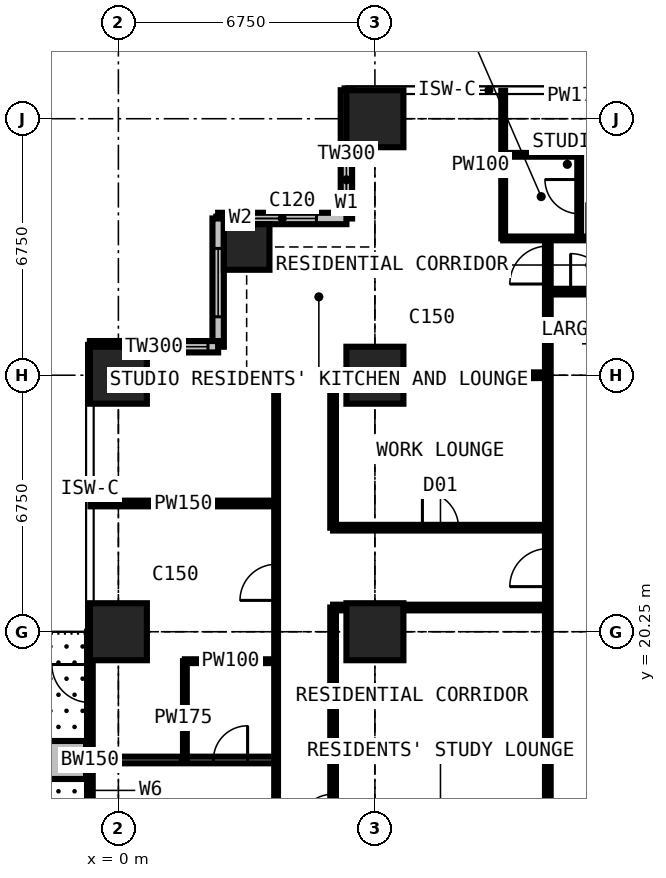
"""IFC4 building model, lengths in metres.
Left out: names, types, materials, properties, quantities, classifications, styles, units other than length and angle.
Written with IfcOpenShell. Run it as: python <this file> out.ifc"""

import sys

from ifc_helpers import new_model, si_unit, direction, frame, frame_2d, origin, origin_2d, place, context, subcontext, project, spatial, rectangle, extrude, element, fill, save


model = new_model("IFC4")
c1 = context("Model", 3, precision=1e-05, world=origin(), true_north=direction((0.0, 1.0)))
c2 = subcontext(c1, "Body", "Model", "MODEL_VIEW")
j1 = project(units=[si_unit("LENGTHUNIT", "METRE"), si_unit("PLANEANGLEUNIT", "RADIAN")], contexts=[c1])
p1 = place(None, origin())
s1 = spatial("IfcSite", under=j1, at=p1, CompositionType="ELEMENT")
p2 = place(p1, origin())
s2 = spatial("IfcBuilding", under=s1, at=p2, CompositionType="ELEMENT")
p3 = place(p2, frame((0.0, 0.0, 149.4)))
s3 = spatial("IfcBuildingStorey", under=s2, at=p3, CompositionType="ELEMENT", Elevation=149.4)
for number, where, z_axis, x_axis in (
    (1, (0.0, 20.25, 0.0), (0.0, 0.0, 1.0), (1.0, 0.0, 0.0)),
    (2, (0.0, 27.0, 0.0), (0.0, 0.0, 1.0), (1.0, 0.0, 0.0)),
):
    element("IfcColumn", number, at=place(p3, frame(where, z_axis=z_axis, x_axis=x_axis)), inside=s3, PredefinedType="COLUMN", context=c2, shape_type="SweptSolid", body=[
        extrude(rectangle(XDim=1.5, YDim=1.5, at=origin_2d()), origin(), (0.0, 0.0, 1.0), 3.6),
    ])
p4 = place(p3, frame((3.375, 30.375, 0.0), z_axis=(0.0, 0.0, 1.0), x_axis=(1.0, 0.0, 0.0)))
e3 = element("IfcColumn", 3, at=p4, inside=s3, PredefinedType="COLUMN", context=c2, shape_type="SweptSolid", body=[
    extrude(rectangle(XDim=1.2, YDim=1.2, at=origin_2d()), origin(), (0.0, 0.0, 1.0), 3.6),
])
for number, where, z_axis, x_axis in (
    (4, (6.75, 20.25, 0.0), (0.0, 0.0, 1.0), (1.0, 0.0, 0.0)),
    (5, (6.75, 27.0, 0.0), (0.0, 0.0, 1.0), (1.0, 0.0, 0.0)),
    (6, (6.75, 33.75, 0.0), (0.0, 0.0, 1.0), (1.0, 0.0, 0.0)),
):
    element("IfcColumn", number, at=place(p3, frame(where, z_axis=z_axis, x_axis=x_axis)), inside=s3, PredefinedType="COLUMN", context=c2, shape_type="SweptSolid", body=[
        extrude(rectangle(XDim=1.5, YDim=1.5, at=origin_2d()), origin(), (0.0, 0.0, 1.0), 3.6),
    ])
p5 = place(p3, frame((6.0, 34.5, 0.0), z_axis=(0.0, 0.0, 1.0), x_axis=(0.0, -1.0, 0.0)))
e7 = element("IfcWall", 7, at=p5, inside=s3, PredefinedType="SOLIDWALL", context=c2, shape_type="SweptSolid", body=[
    extrude(rectangle(XDim=3.375, YDim=0.3, at=frame_2d((1.688, 0.0))), origin(), (0.0, 0.0, 1.0), 3.375),
])
p6 = place(p5, frame((1.607, 0.0, 0.9)))
e8 = element("IfcOpeningElement", 8, at=p6, cuts=e7, PredefinedType="OPENING", context=c2, shape_type="SweptSolid", body=[
    extrude(rectangle(XDim=1.5, YDim=1.8, at=frame_2d((0.75, 0.9))), frame((0.0, 0.16, 0.0), z_axis=(0.0, -1.0, 0.0), x_axis=(1.0, 0.0, 0.0)), (0.0, 0.0, 1.0), 0.32),
])
p7 = place(p3, frame((6.0, 31.125, 0.0), z_axis=(0.0, 0.0, 1.0), x_axis=(-1.0, 0.0, 0.0)))
e9 = element("IfcWall", 9, at=p7, inside=s3, PredefinedType="SOLIDWALL", context=c2, shape_type="SweptSolid", body=[
    extrude(rectangle(XDim=3.375, YDim=0.3, at=frame_2d((1.688, 0.0))), origin(), (0.0, 0.0, 1.0), 3.375),
])
p8 = place(p7, frame((0.788, 0.0, 0.6)))
e10 = element("IfcOpeningElement", 10, at=p8, cuts=e9, PredefinedType="OPENING", context=c2, shape_type="SweptSolid", body=[
    extrude(rectangle(XDim=1.8, YDim=2.1, at=frame_2d((0.9, 1.05))), frame((0.0, 0.16, 0.0), z_axis=(0.0, -1.0, 0.0), x_axis=(1.0, 0.0, 0.0)), (0.0, 0.0, 1.0), 0.32),
])
p9 = place(p3, frame((2.625, 31.125, 0.0), z_axis=(0.0, 0.0, 1.0), x_axis=(0.0, -1.0, 0.0)))
e11 = element("IfcWall", 11, at=p9, inside=s3, PredefinedType="SOLIDWALL", context=c2, shape_type="SweptSolid", body=[
    extrude(rectangle(XDim=3.375, YDim=0.3, at=frame_2d((1.688, 0.0))), origin(), (0.0, 0.0, 1.0), 3.375),
])
p10 = place(p9, frame((0.788, 0.0, 0.6)))
e12 = element("IfcOpeningElement", 12, at=p10, cuts=e11, PredefinedType="OPENING", context=c2, shape_type="SweptSolid", body=[
    extrude(rectangle(XDim=1.8, YDim=2.1, at=frame_2d((0.9, 1.05))), frame((0.0, 0.16, 0.0), z_axis=(0.0, -1.0, 0.0), x_axis=(1.0, 0.0, 0.0)), (0.0, 0.0, 1.0), 0.32),
])
p11 = place(p3, frame((2.625, 27.75, 0.0), z_axis=(0.0, 0.0, 1.0), x_axis=(-1.0, 0.0, 0.0)))
e13 = element("IfcWall", 13, at=p11, inside=s3, PredefinedType="SOLIDWALL", context=c2, shape_type="SweptSolid", body=[
    extrude(rectangle(XDim=3.375, YDim=0.3, at=frame_2d((1.688, 0.0))), origin(), (0.0, 0.0, 1.0), 3.375),
])
p12 = place(p11, frame((0.268, 0.0, 0.9)))
e14 = element("IfcOpeningElement", 14, at=p12, cuts=e13, PredefinedType="OPENING", context=c2, shape_type="SweptSolid", body=[
    extrude(rectangle(XDim=1.5, YDim=1.8, at=frame_2d((0.75, 0.9))), frame((0.0, 0.16, 0.0), z_axis=(0.0, -1.0, 0.0), x_axis=(1.0, 0.0, 0.0)), (0.0, 0.0, 1.0), 0.32),
])
p13 = place(p3, frame((-0.75, 13.5, 0.0), z_axis=(0.0, 0.0, 1.0), x_axis=(0.0, 1.0, 0.0)))
e15 = element("IfcWall", 15, at=p13, inside=s3, PredefinedType="SOLIDWALL", context=c2, shape_type="SweptSolid", body=[
    extrude(rectangle(XDim=6.75, YDim=0.15, at=frame_2d((3.375, 0.0))), origin(), (0.0, 0.0, 1.0), 3.375),
])
p14 = place(p13, frame((0.863, 0.0, 0.0)))
e16 = element("IfcOpeningElement", 16, at=p14, cuts=e15, PredefinedType="OPENING", context=c2, shape_type="SweptSolid", body=[
    extrude(rectangle(XDim=1.0, YDim=2.2, at=frame_2d((0.5, 1.1))), frame((0.0, 0.085, 0.0), z_axis=(0.0, -1.0, 0.0), x_axis=(1.0, 0.0, 0.0)), (0.0, 0.0, 1.0), 0.17),
])
p15 = place(p13, frame((1.975, 0.0, 0.9)))
e17 = element("IfcOpeningElement", 17, at=p15, cuts=e15, PredefinedType="OPENING", context=c2, shape_type="SweptSolid", body=[
    extrude(rectangle(XDim=1.2, YDim=1.8, at=frame_2d((0.6, 0.9))), frame((0.0, 0.085, 0.0), z_axis=(0.0, -1.0, 0.0), x_axis=(1.0, 0.0, 0.0)), (0.0, 0.0, 1.0), 0.17),
])
p16 = place(p13, frame((4.887, 0.0, 0.0)))
e18 = element("IfcOpeningElement", 18, at=p16, cuts=e15, PredefinedType="OPENING", context=c2, shape_type="SweptSolid", body=[
    extrude(rectangle(XDim=1.0, YDim=2.2, at=frame_2d((0.5, 1.1))), frame((0.0, 0.085, 0.0), z_axis=(0.0, -1.0, 0.0), x_axis=(1.0, 0.0, 0.0)), (0.0, 0.0, 1.0), 0.17),
])
p17 = place(p13, frame((3.575, 0.0, 0.9)))
e19 = element("IfcOpeningElement", 19, at=p17, cuts=e15, PredefinedType="OPENING", context=c2, shape_type="SweptSolid", body=[
    extrude(rectangle(XDim=1.2, YDim=1.8, at=frame_2d((0.6, 0.9))), frame((0.0, 0.085, 0.0), z_axis=(0.0, -1.0, 0.0), x_axis=(1.0, 0.0, 0.0)), (0.0, 0.0, 1.0), 0.17),
])
p18 = place(p3, frame((-0.85, 16.875, 0.0), z_axis=(0.0, 0.0, 1.0), x_axis=(-1.0, 0.0, 0.0)))
e20 = element("IfcWall", 20, at=p18, inside=s3, PredefinedType="USERDEFINED", context=c2, shape_type="SweptSolid", body=[
    extrude(rectangle(XDim=2.2, YDim=1.0, at=frame_2d((1.1, 0.0))), origin(), (0.0, 0.0, 1.0), 0.9),
])
p19 = place(p3, frame((-0.734, 16.875, 0.0), z_axis=(0.0, 0.0, 1.0), x_axis=(1.0, 0.0, 0.0)))
e21 = element("IfcWall", 21, at=p19, inside=s3, PredefinedType="PARTITIONING", context=c2, shape_type="SweptSolid", body=[
    extrude(rectangle(XDim=4.884, YDim=0.175, at=frame_2d((2.442, 0.0))), origin(), (0.0, 0.0, 1.0), 3.375),
])
p20 = place(p19, frame((3.234, 0.0, 0.0)))
e22 = element("IfcOpeningElement", 22, at=p20, cuts=e21, PredefinedType="OPENING", context=c2, shape_type="SweptSolid", body=[
    extrude(rectangle(XDim=0.9, YDim=2.2, at=frame_2d((0.45, 1.1))), frame((0.0, 0.097, 0.0), z_axis=(0.0, -1.0, 0.0), x_axis=(1.0, 0.0, 0.0)), (0.0, 0.0, 1.0), 0.195),
])
p21 = place(p3, frame((-0.734, 23.625, 0.0), z_axis=(0.0, 0.0, 1.0), x_axis=(1.0, 0.0, 0.0)))
e23 = element("IfcWall", 23, at=p21, inside=s3, PredefinedType="PARTITIONING", context=c2, shape_type="SweptSolid", body=[
    extrude(rectangle(XDim=4.884, YDim=0.15, at=frame_2d((2.442, 0.0))), origin(), (0.0, 0.0, 1.0), 3.375),
])
p22 = place(p3, frame((1.75, 16.875, 0.0), z_axis=(0.0, 0.0, 1.0), x_axis=(0.0, 1.0, 0.0)))
e24 = element("IfcWall", 24, at=p22, inside=s3, PredefinedType="PARTITIONING", context=c2, shape_type="SweptSolid", body=[
    extrude(rectangle(XDim=2.6, YDim=0.1, at=frame_2d((1.3, 0.0))), origin(), (0.0, 0.0, 1.0), 3.375),
])
p23 = place(p3, frame((1.75, 19.475, 0.0), z_axis=(0.0, 0.0, 1.0), x_axis=(1.0, 0.0, 0.0)))
e25 = element("IfcWall", 25, at=p23, inside=s3, PredefinedType="PARTITIONING", context=c2, shape_type="SweptSolid", body=[
    extrude(rectangle(XDim=2.4, YDim=0.1, at=frame_2d((1.2, 0.0))), origin(), (0.0, 0.0, 1.0), 3.375),
])
p24 = place(p3, frame((4.15, 10.125, 0.0), z_axis=(0.0, 0.0, 1.0), x_axis=(0.0, 1.0, 0.0)))
e26 = element("IfcWall", 26, at=p24, inside=s3, PredefinedType="PARTITIONING", context=c2, shape_type="SweptSolid", body=[
    extrude(rectangle(XDim=16.875, YDim=0.1, at=frame_2d((8.438, 0.0))), origin(), (0.0, 0.0, 1.0), 3.375),
])
p25 = place(p24, frame((4.2, 0.0, 0.0)))
e27 = element("IfcOpeningElement", 27, at=p25, cuts=e26, PredefinedType="OPENING", context=c2, shape_type="SweptSolid", body=[
    extrude(rectangle(XDim=0.95, YDim=2.2, at=frame_2d((0.475, 1.1))), frame((0.0, 0.06, 0.0), z_axis=(0.0, -1.0, 0.0), x_axis=(1.0, 0.0, 0.0)), (0.0, 0.0, 1.0), 0.12),
])
p26 = place(p24, frame((10.95, 0.0, 0.0)))
e28 = element("IfcOpeningElement", 28, at=p26, cuts=e26, PredefinedType="OPENING", context=c2, shape_type="SweptSolid", body=[
    extrude(rectangle(XDim=0.95, YDim=2.2, at=frame_2d((0.475, 1.1))), frame((0.0, 0.06, 0.0), z_axis=(0.0, -1.0, 0.0), x_axis=(1.0, 0.0, 0.0)), (0.0, 0.0, 1.0), 0.12),
])
p27 = place(p3, frame((4.15, 27.0, 0.0), z_axis=(0.0, 0.0, 1.0), x_axis=(1.0, 0.0, 0.0)))
e29 = element("IfcWall", 29, at=p27, inside=s3, PredefinedType="PARTITIONING", context=c2, shape_type="SweptSolid", body=[
    extrude(rectangle(XDim=7.15, YDim=0.15, at=frame_2d((3.575, 0.0))), origin(), (0.0, 0.0, 1.0), 2.806),
])
p28 = place(p3, frame((5.65, 10.125, 0.0), z_axis=(0.0, 0.0, 1.0), x_axis=(0.0, 1.0, 0.0)))
e30 = element("IfcWall", 30, at=p28, inside=s3, PredefinedType="PARTITIONING", context=c2, shape_type="SweptSolid", body=[
    extrude(rectangle(XDim=10.762, YDim=0.15, at=frame_2d((5.381, 0.0))), origin(), (0.0, 0.0, 1.0), 3.375),
])
p29 = place(p28, frame((4.9, 0.0, 0.0)))
e31 = element("IfcOpeningElement", 31, at=p29, cuts=e30, PredefinedType="OPENING", context=c2, shape_type="SweptSolid", body=[
    extrude(rectangle(XDim=0.95, YDim=2.2, at=frame_2d((0.475, 1.1))), frame((0.0, 0.085, 0.0), z_axis=(0.0, -1.0, 0.0), x_axis=(1.0, 0.0, 0.0)), (0.0, 0.0, 1.0), 0.17),
])
p30 = place(p3, frame((5.65, 20.887, 0.0), z_axis=(0.0, 0.0, 1.0), x_axis=(1.0, 0.0, 0.0)))
e32 = element("IfcWall", 32, at=p30, inside=s3, PredefinedType="PARTITIONING", context=c2, shape_type="SweptSolid", body=[
    extrude(rectangle(XDim=5.65, YDim=0.15, at=frame_2d((2.825, 0.0))), origin(), (0.0, 0.0, 1.0), 3.375),
])
p31 = place(p3, frame((5.65, 22.988, 0.0), z_axis=(0.0, 0.0, 1.0), x_axis=(0.0, 1.0, 0.0)))
e33 = element("IfcWall", 33, at=p31, inside=s3, PredefinedType="PARTITIONING", context=c2, shape_type="SweptSolid", body=[
    extrude(rectangle(XDim=4.012, YDim=0.15, at=frame_2d((2.006, 0.0))), origin(), (0.0, 0.0, 1.0), 3.375),
])
p32 = place(p3, frame((5.65, 22.988, 0.0), z_axis=(0.0, 0.0, 1.0), x_axis=(1.0, 0.0, 0.0)))
e34 = element("IfcWall", 34, at=p32, inside=s3, PredefinedType="PARTITIONING", context=c2, shape_type="SweptSolid", body=[
    extrude(rectangle(XDim=5.65, YDim=0.15, at=frame_2d((2.825, 0.0))), origin(), (0.0, 0.0, 1.0), 3.375),
])
p33 = place(p32, frame((2.35, 0.0, 0.0)))
e35 = element("IfcOpeningElement", 35, at=p33, cuts=e34, PredefinedType="OPENING", context=c2, shape_type="SweptSolid", body=[
    extrude(rectangle(XDim=0.95, YDim=2.2, at=frame_2d((0.475, 1.1))), frame((0.0, 0.085, 0.0), z_axis=(0.0, -1.0, 0.0), x_axis=(1.0, 0.0, 0.0)), (0.0, 0.0, 1.0), 0.17),
])
p34 = place(p3, frame((10.125, 30.6, 0.0), z_axis=(0.0, 0.0, 1.0), x_axis=(0.0, 1.0, 0.0)))
e36 = element("IfcWall", 36, at=p34, inside=s3, PredefinedType="PARTITIONING", context=c2, shape_type="SweptSolid", body=[
    extrude(rectangle(XDim=3.884, YDim=0.1, at=frame_2d((1.942, 0.0))), origin(), (0.0, 0.0, 1.0), 3.375),
])
p35 = place(p3, frame((10.125, 30.6, 0.0), z_axis=(0.0, 0.0, 1.0), x_axis=(1.0, 0.0, 0.0)))
e37 = element("IfcWall", 37, at=p35, inside=s3, PredefinedType="PARTITIONING", context=c2, shape_type="SweptSolid", body=[
    extrude(rectangle(XDim=3.375, YDim=0.1, at=frame_2d((1.688, 0.0))), origin(), (0.0, 0.0, 1.0), 3.375),
])
p36 = place(p35, frame((2.2, 0.0, 0.0)))
e38 = element("IfcOpeningElement", 38, at=p36, cuts=e37, PredefinedType="OPENING", context=c2, shape_type="SweptSolid", body=[
    extrude(rectangle(XDim=0.95, YDim=2.2, at=frame_2d((0.475, 1.1))), frame((0.0, 0.06, 0.0), z_axis=(0.0, -1.0, 0.0), x_axis=(1.0, 0.0, 0.0)), (0.0, 0.0, 1.0), 0.12),
])
p37 = place(p3, frame((10.125, 32.8, 0.0), z_axis=(0.0, 0.0, 1.0), x_axis=(1.0, 0.0, 0.0)))
e39 = element("IfcWall", 39, at=p37, inside=s3, PredefinedType="PARTITIONING", context=c2, shape_type="SweptSolid", body=[
    extrude(rectangle(XDim=2.0, YDim=0.1, at=frame_2d((1.0, 0.0))), origin(), (0.0, 0.0, 1.0), 3.375),
])
p38 = place(p3, frame((11.3, 11.3, 0.0), z_axis=(0.0, 0.0, 1.0), x_axis=(0.0, 1.0, 0.0)))
e40 = element("IfcWall", 40, at=p38, inside=s3, PredefinedType="PARTITIONING", context=c2, shape_type="SweptSolid", body=[
    extrude(rectangle(XDim=19.3, YDim=0.15, at=frame_2d((9.65, 0.0))), origin(), (0.0, 0.0, 1.0), 3.375),
])
p39 = place(p38, frame((18.1, 0.0, 0.0)))
e41 = element("IfcOpeningElement", 41, at=p39, cuts=e40, PredefinedType="OPENING", context=c2, shape_type="SweptSolid", body=[
    extrude(rectangle(XDim=1.0, YDim=2.2, at=frame_2d((0.5, 1.1))), frame((0.0, 0.085, 0.0), z_axis=(0.0, -1.0, 0.0), x_axis=(1.0, 0.0, 0.0)), (0.0, 0.0, 1.0), 0.17),
])
p40 = place(p38, frame((10.137, 0.0, 0.0)))
e42 = element("IfcOpeningElement", 42, at=p40, cuts=e40, PredefinedType="OPENING", context=c2, shape_type="SweptSolid", body=[
    extrude(rectangle(XDim=1.0, YDim=2.2, at=frame_2d((0.5, 1.1))), frame((0.0, 0.085, 0.0), z_axis=(0.0, -1.0, 0.0), x_axis=(1.0, 0.0, 0.0)), (0.0, 0.0, 1.0), 0.17),
])
p41 = place(p3, frame((11.3, 29.2, 0.0), z_axis=(0.0, 0.0, 1.0), x_axis=(1.0, 0.0, 0.0)))
e43 = element("IfcWall", 43, at=p41, inside=s3, PredefinedType="PARTITIONING", context=c2, shape_type="SweptSolid", body=[
    extrude(rectangle(XDim=19.809, YDim=0.15, at=frame_2d((9.904, 0.0))), origin(), (0.0, 0.0, 1.0), 3.375),
])
p42 = place(p41, frame((12.9, 0.0, 0.0)))
e44 = element("IfcOpeningElement", 44, at=p42, cuts=e43, PredefinedType="OPENING", context=c2, shape_type="SweptSolid", body=[
    extrude(rectangle(XDim=1.0, YDim=2.2, at=frame_2d((0.5, 1.1))), frame((0.0, 0.085, 0.0), z_axis=(0.0, -1.0, 0.0), x_axis=(1.0, 0.0, 0.0)), (0.0, 0.0, 1.0), 0.17),
])
p43 = place(p41, frame((6.4, 0.0, 0.0)))
e45 = element("IfcOpeningElement", 45, at=p43, cuts=e43, PredefinedType="OPENING", context=c2, shape_type="SweptSolid", body=[
    extrude(rectangle(XDim=0.95, YDim=2.2, at=frame_2d((0.475, 1.1))), frame((0.0, 0.085, 0.0), z_axis=(0.0, -1.0, 0.0), x_axis=(1.0, 0.0, 0.0)), (0.0, 0.0, 1.0), 0.17),
])
p44 = place(p41, frame((0.6, 0.0, 0.0)))
e46 = element("IfcOpeningElement", 46, at=p44, cuts=e43, PredefinedType="OPENING", context=c2, shape_type="SweptSolid", body=[
    extrude(rectangle(XDim=1.0, YDim=2.2, at=frame_2d((0.5, 1.1))), frame((0.0, 0.085, 0.0), z_axis=(0.0, -1.0, 0.0), x_axis=(1.0, 0.0, 0.0)), (0.0, 0.0, 1.0), 0.17),
])
p45 = place(p3, frame((12.125, 30.6, 0.0), z_axis=(0.0, 0.0, 1.0), x_axis=(0.0, 1.0, 0.0)))
e47 = element("IfcWall", 47, at=p45, inside=s3, PredefinedType="PARTITIONING", context=c2, shape_type="SweptSolid", body=[
    extrude(rectangle(XDim=2.2, YDim=0.1, at=frame_2d((1.1, 0.0))), origin(), (0.0, 0.0, 1.0), 3.375),
])
p46 = place(p45, frame((0.65, 0.0, 0.0)))
e48 = element("IfcOpeningElement", 48, at=p46, cuts=e47, PredefinedType="OPENING", context=c2, shape_type="SweptSolid", body=[
    extrude(rectangle(XDim=0.9, YDim=2.2, at=frame_2d((0.45, 1.1))), frame((0.0, 0.06, 0.0), z_axis=(0.0, -1.0, 0.0), x_axis=(1.0, 0.0, 0.0)), (0.0, 0.0, 1.0), 0.12),
])
p47 = place(p6, origin())
e49 = element("IfcWindow", 49, at=p47, inside=s3, PartitioningType="SINGLE_PANEL", PredefinedType="WINDOW", context=c2, shape_type="SweptSolid", body=[
    extrude(rectangle(XDim=1.5, YDim=1.8, at=frame_2d((0.75, 0.9))), frame((0.0, 0.03, 0.0), z_axis=(0.0, -1.0, 0.0), x_axis=(1.0, 0.0, 0.0)), (0.0, 0.0, 1.0), 0.06),
])
fill(e8, e49)
p48 = place(p8, origin())
e50 = element("IfcWindow", 50, at=p48, inside=s3, PartitioningType="SINGLE_PANEL", PredefinedType="WINDOW", context=c2, shape_type="SweptSolid", body=[
    extrude(rectangle(XDim=1.8, YDim=2.1, at=frame_2d((0.9, 1.05))), frame((0.0, 0.03, 0.0), z_axis=(0.0, -1.0, 0.0), x_axis=(1.0, 0.0, 0.0)), (0.0, 0.0, 1.0), 0.06),
])
fill(e10, e50)
p49 = place(p10, origin())
e51 = element("IfcWindow", 51, at=p49, inside=s3, PartitioningType="SINGLE_PANEL", PredefinedType="WINDOW", context=c2, shape_type="SweptSolid", body=[
    extrude(rectangle(XDim=1.8, YDim=2.1, at=frame_2d((0.9, 1.05))), frame((0.0, 0.03, 0.0), z_axis=(0.0, -1.0, 0.0), x_axis=(1.0, 0.0, 0.0)), (0.0, 0.0, 1.0), 0.06),
])
fill(e12, e51)
p50 = place(p12, origin())
e52 = element("IfcWindow", 52, at=p50, inside=s3, PartitioningType="SINGLE_PANEL", PredefinedType="WINDOW", context=c2, shape_type="SweptSolid", body=[
    extrude(rectangle(XDim=1.5, YDim=1.8, at=frame_2d((0.75, 0.9))), frame((0.0, 0.03, 0.0), z_axis=(0.0, -1.0, 0.0), x_axis=(1.0, 0.0, 0.0)), (0.0, 0.0, 1.0), 0.06),
])
fill(e14, e52)
p51 = place(p15, origin())
e53 = element("IfcWindow", 53, at=p51, inside=s3, PartitioningType="SINGLE_PANEL", PredefinedType="WINDOW", context=c2, shape_type="SweptSolid", body=[
    extrude(rectangle(XDim=1.2, YDim=1.8, at=frame_2d((0.6, 0.9))), frame((0.0, 0.03, 0.0), z_axis=(0.0, -1.0, 0.0), x_axis=(1.0, 0.0, 0.0)), (0.0, 0.0, 1.0), 0.06),
])
fill(e17, e53)
p52 = place(p16, origin())
e54 = element("IfcDoor", 54, at=p52, inside=s3, OperationType="SINGLE_SWING_RIGHT", PredefinedType="DOOR", context=c2, shape_type="SweptSolid", body=[
    extrude(rectangle(XDim=1.0, YDim=2.2, at=frame_2d((0.5, 1.1))), frame((0.0, 0.025, 0.0), z_axis=(0.0, -1.0, 0.0), x_axis=(1.0, 0.0, 0.0)), (0.0, 0.0, 1.0), 0.05),
])
fill(e18, e54)
p53 = place(p17, origin())
e55 = element("IfcWindow", 55, at=p53, inside=s3, PartitioningType="SINGLE_PANEL", PredefinedType="WINDOW", context=c2, shape_type="SweptSolid", body=[
    extrude(rectangle(XDim=1.2, YDim=1.8, at=frame_2d((0.6, 0.9))), frame((0.0, 0.03, 0.0), z_axis=(0.0, -1.0, 0.0), x_axis=(1.0, 0.0, 0.0)), (0.0, 0.0, 1.0), 0.06),
])
fill(e19, e55)
p54 = place(p46, origin())
e56 = element("IfcDoor", 56, at=p54, inside=s3, OperationType="SINGLE_SWING_RIGHT", PredefinedType="DOOR", context=c2, shape_type="SweptSolid", body=[
    extrude(rectangle(XDim=0.9, YDim=2.2, at=frame_2d((0.45, 1.1))), frame((0.0, 0.025, 0.0), z_axis=(0.0, -1.0, 0.0), x_axis=(1.0, 0.0, 0.0)), (0.0, 0.0, 1.0), 0.05),
])
fill(e48, e56)
p55 = place(p44, origin())
e57 = element("IfcDoor", 57, at=p55, inside=s3, OperationType="SINGLE_SWING_LEFT", PredefinedType="DOOR", context=c2, shape_type="SweptSolid", body=[
    extrude(rectangle(XDim=1.0, YDim=2.2, at=frame_2d((0.5, 1.1))), frame((0.0, 0.025, 0.0), z_axis=(0.0, -1.0, 0.0), x_axis=(1.0, 0.0, 0.0)), (0.0, 0.0, 1.0), 0.05),
])
fill(e46, e57)
p56 = place(p39, origin())
e58 = element("IfcDoor", 58, at=p56, inside=s3, OperationType="SINGLE_SWING_LEFT", PredefinedType="DOOR", context=c2, shape_type="SweptSolid", body=[
    extrude(rectangle(XDim=1.0, YDim=2.2, at=frame_2d((0.5, 1.1))), frame((0.0, 0.025, 0.0), z_axis=(0.0, -1.0, 0.0), x_axis=(1.0, 0.0, 0.0)), (0.0, 0.0, 1.0), 0.05),
])
fill(e41, e58)
p57 = place(p26, origin())
e59 = element("IfcDoor", 59, at=p57, inside=s3, OperationType="SINGLE_SWING_LEFT", PredefinedType="DOOR", context=c2, shape_type="SweptSolid", body=[
    extrude(rectangle(XDim=0.95, YDim=2.2, at=frame_2d((0.475, 1.1))), frame((0.0, 0.025, 0.0), z_axis=(0.0, -1.0, 0.0), x_axis=(1.0, 0.0, 0.0)), (0.0, 0.0, 1.0), 0.05),
])
fill(e28, e59)
p58 = place(p20, origin())
e60 = element("IfcDoor", 60, at=p58, inside=s3, OperationType="SINGLE_SWING_RIGHT", PredefinedType="DOOR", context=c2, shape_type="SweptSolid", body=[
    extrude(rectangle(XDim=0.9, YDim=2.2, at=frame_2d((0.45, 1.1))), frame((0.0, 0.025, 0.0), z_axis=(0.0, -1.0, 0.0), x_axis=(1.0, 0.0, 0.0)), (0.0, 0.0, 1.0), 0.05),
])
fill(e22, e60)
p59 = place(p40, origin())
e61 = element("IfcDoor", 61, at=p59, inside=s3, OperationType="SINGLE_SWING_LEFT", PredefinedType="DOOR", context=c2, shape_type="SweptSolid", body=[
    extrude(rectangle(XDim=1.0, YDim=2.2, at=frame_2d((0.5, 1.1))), frame((0.0, 0.025, 0.0), z_axis=(0.0, -1.0, 0.0), x_axis=(1.0, 0.0, 0.0)), (0.0, 0.0, 1.0), 0.05),
])
fill(e42, e61)
p60 = place(p29, origin())
e62 = element("IfcDoor", 62, at=p60, inside=s3, OperationType="SINGLE_SWING_LEFT", PredefinedType="DOOR", context=c2, shape_type="SweptSolid", body=[
    extrude(rectangle(XDim=0.95, YDim=2.2, at=frame_2d((0.475, 1.1))), frame((0.0, 0.025, 0.0), z_axis=(0.0, -1.0, 0.0), x_axis=(1.0, 0.0, 0.0)), (0.0, 0.0, 1.0), 0.05),
])
fill(e31, e62)
p61 = place(p33, origin())
e63 = element("IfcDoor", 63, at=p61, inside=s3, OperationType="SINGLE_SWING_LEFT", PredefinedType="DOOR", context=c2, shape_type="SweptSolid", body=[
    extrude(rectangle(XDim=0.95, YDim=2.2, at=frame_2d((0.475, 1.1))), frame((0.0, 0.025, 0.0), z_axis=(0.0, -1.0, 0.0), x_axis=(1.0, 0.0, 0.0)), (0.0, 0.0, 1.0), 0.05),
])
fill(e35, e63)
save(model, sys.argv[1])
